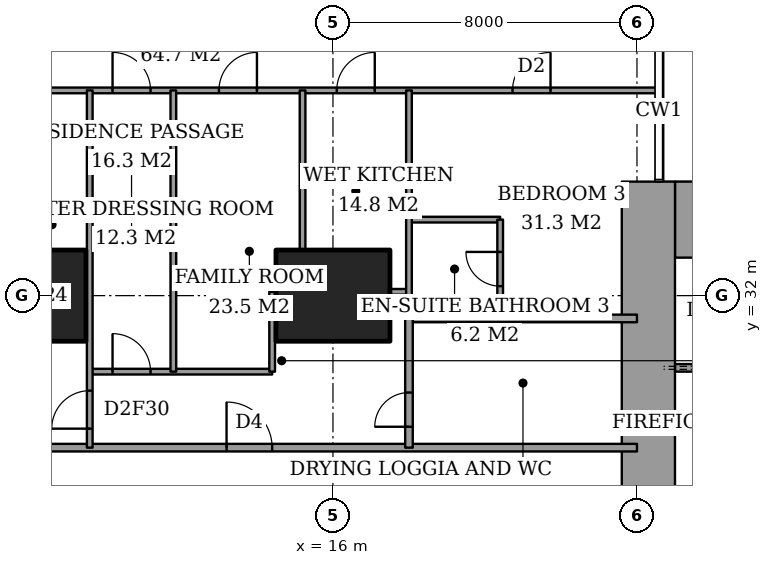
"""IFC4 building model, lengths in metres.
Left out: names, types, materials, properties, quantities, classifications, styles, units other than length and angle.
Written with IfcOpenShell. Run it as: python <this file> out.ifc"""

import sys

from ifc_helpers import new_model, si_unit, direction, frame, frame_2d, origin, origin_2d, place, context, subcontext, project, spatial, rectangle, extrude, element, fill, save


model = new_model("IFC4")
c1 = context("Model", 3, precision=1e-05, world=origin(), true_north=direction((0.0, 1.0)))
c2 = subcontext(c1, "Body", "Model", "MODEL_VIEW")
j1 = project(units=[si_unit("LENGTHUNIT", "METRE"), si_unit("PLANEANGLEUNIT", "RADIAN")], contexts=[c1])
p1 = place(None, origin())
s1 = spatial("IfcSite", under=j1, at=p1, CompositionType="ELEMENT")
p2 = place(p1, origin())
s2 = spatial("IfcBuilding", under=s1, at=p2, CompositionType="ELEMENT")
p3 = place(p2, frame((0.0, 0.0, 146.6)))
s3 = spatial("IfcBuildingStorey", under=s2, at=p3, CompositionType="ELEMENT", Elevation=146.6)
for number, where, z_axis, x_axis in (
    (1, (8.0, 32.0, 0.0), (0.0, 0.0, 1.0), (1.0, 0.0, 0.0)),
    (2, (16.0, 32.0, 0.0), (0.0, 0.0, 1.0), (1.0, 0.0, 0.0)),
):
    element("IfcColumn", number, at=place(p3, frame(where, z_axis=z_axis, x_axis=x_axis)), inside=s3, PredefinedType="COLUMN", context=c2, shape_type="SweptSolid", body=[
        extrude(rectangle(XDim=3.0, YDim=2.4, at=origin_2d()), origin(), (0.0, 0.0, 1.0), 3.6),
    ])
p4 = place(p3, frame((25.0, 34.0, 0.0), z_axis=(0.0, 0.0, 1.0), x_axis=(1.0, 0.0, 0.0)))
e3 = element("IfcWall", 3, at=p4, inside=s3, PredefinedType="SHEAR", context=c2, shape_type="SweptSolid", body=[
    extrude(rectangle(XDim=3.15, YDim=2.0, at=frame_2d((1.575, 0.0))), origin(), (0.0, 0.0, 1.0), 3.6),
])
p5 = place(p3, frame((24.3, 23.15, 0.0), z_axis=(0.0, 0.0, 1.0), x_axis=(0.0, 1.0, 0.0)))
e4 = element("IfcWall", 4, at=p5, inside=s3, PredefinedType="SHEAR", context=c2, shape_type="SweptSolid", body=[
    extrude(rectangle(XDim=11.85, YDim=1.4, at=frame_2d((5.925, 0.0))), origin(), (0.0, 0.0, 1.0), 3.6),
])
p6 = place(p5, frame((0.75, 0.0, 0.0)))
e5 = element("IfcOpeningElement", 5, at=p6, cuts=e4, PredefinedType="OPENING", context=c2, shape_type="SweptSolid", body=[
    extrude(rectangle(XDim=1.8, YDim=2.4, at=frame_2d((0.9, 1.2))), frame((0.0, 0.71, 0.0), z_axis=(0.0, -1.0, 0.0), x_axis=(1.0, 0.0, 0.0)), (0.0, 0.0, 1.0), 1.42),
])
p7 = place(p3, frame((6.725, 28.0, 0.0), z_axis=(0.0, 0.0, 1.0), x_axis=(1.0, 0.0, 0.0)))
e6 = element("IfcWall", 6, at=p7, inside=s3, PredefinedType="PARTITIONING", context=c2, shape_type="SweptSolid", body=[
    extrude(rectangle(XDim=17.275, YDim=0.2, at=frame_2d((8.637, 0.0))), origin(), (0.0, 0.0, 1.0), 3.35),
])
p8 = place(p7, frame((6.475, 0.0, 0.0)))
e7 = element("IfcOpeningElement", 7, at=p8, cuts=e6, PredefinedType="OPENING", context=c2, shape_type="SweptSolid", body=[
    extrude(rectangle(XDim=1.2, YDim=2.4, at=frame_2d((0.6, 1.2))), frame((0.0, 0.11, 0.0), z_axis=(0.0, -1.0, 0.0), x_axis=(1.0, 0.0, 0.0)), (0.0, 0.0, 1.0), 0.22),
])
p9 = place(p3, frame((9.6, 30.0, 0.0), z_axis=(0.0, 0.0, 1.0), x_axis=(1.0, 0.0, 0.0)))
e8 = element("IfcWall", 8, at=p9, inside=s3, PredefinedType="PARTITIONING", context=c2, shape_type="SweptSolid", body=[
    extrude(rectangle(XDim=4.8, YDim=0.15, at=frame_2d((2.4, 0.0))), origin(), (0.0, 0.0, 1.0), 3.35),
])
p10 = place(p9, frame((0.6, 0.0, 0.0)))
e9 = element("IfcOpeningElement", 9, at=p10, cuts=e8, PredefinedType="OPENING", context=c2, shape_type="SweptSolid", body=[
    extrude(rectangle(XDim=1.0, YDim=2.1, at=frame_2d((0.5, 1.05))), frame((0.0, 0.085, 0.0), z_axis=(0.0, -1.0, 0.0), x_axis=(1.0, 0.0, 0.0)), (0.0, 0.0, 1.0), 0.17),
])
p11 = place(p3, frame((18.0, 31.4, 0.0), z_axis=(0.0, 0.0, 1.0), x_axis=(1.0, 0.0, 0.0)))
e10 = element("IfcWall", 10, at=p11, inside=s3, PredefinedType="PARTITIONING", context=c2, shape_type="SweptSolid", body=[
    extrude(rectangle(XDim=6.0, YDim=0.2, at=frame_2d((3.0, 0.0))), origin(), (0.0, 0.0, 1.0), 3.35),
])
p12 = place(p3, frame((17.5, 32.1, 0.0), z_axis=(0.0, 0.0, 1.0), x_axis=(1.0, 0.0, 0.0)))
e11 = element("IfcWall", 11, at=p12, inside=s3, PredefinedType="PARTITIONING", context=c2, shape_type="SweptSolid", body=[
    extrude(rectangle(XDim=0.5, YDim=0.15, at=frame_2d((0.25, 0.0))), origin(), (0.0, 0.0, 1.0), 2.634),
])
p13 = place(p3, frame((18.0, 34.0, 0.0), z_axis=(0.0, 0.0, 1.0), x_axis=(1.0, 0.0, 0.0)))
e12 = element("IfcWall", 12, at=p13, inside=s3, PredefinedType="PARTITIONING", context=c2, shape_type="SweptSolid", body=[
    extrude(rectangle(XDim=2.4, YDim=0.15, at=frame_2d((1.2, 0.0))), origin(), (0.0, 0.0, 1.0), 3.35),
])
p14 = place(p3, frame((-0.45, 37.4, 0.0), z_axis=(0.0, 0.0, 1.0), x_axis=(1.0, 0.0, 0.0)))
e13 = element("IfcWall", 13, at=p14, inside=s3, PredefinedType="PARTITIONING", context=c2, shape_type="SweptSolid", body=[
    extrude(rectangle(XDim=25.011, YDim=0.15, at=frame_2d((12.505, 0.0))), origin(), (0.0, 0.0, 1.0), 3.35),
])
p15 = place(p14, frame((10.65, 0.0, 0.0)))
e14 = element("IfcOpeningElement", 14, at=p15, cuts=e13, PredefinedType="OPENING", context=c2, shape_type="SweptSolid", body=[
    extrude(rectangle(XDim=1.0, YDim=2.1, at=frame_2d((0.5, 1.05))), frame((0.0, 0.085, 0.0), z_axis=(0.0, -1.0, 0.0), x_axis=(1.0, 0.0, 0.0)), (0.0, 0.0, 1.0), 0.17),
])
p16 = place(p14, frame((3.087, 0.0, 0.0)))
e15 = element("IfcOpeningElement", 15, at=p16, cuts=e13, PredefinedType="OPENING", context=c2, shape_type="SweptSolid", body=[
    extrude(rectangle(XDim=1.0, YDim=2.1, at=frame_2d((0.5, 1.05))), frame((0.0, 0.085, 0.0), z_axis=(0.0, -1.0, 0.0), x_axis=(1.0, 0.0, 0.0)), (0.0, 0.0, 1.0), 0.17),
])
p17 = place(p14, frame((13.45, 0.0, 0.0)))
e16 = element("IfcOpeningElement", 16, at=p17, cuts=e13, PredefinedType="OPENING", context=c2, shape_type="SweptSolid", body=[
    extrude(rectangle(XDim=1.0, YDim=2.1, at=frame_2d((0.5, 1.05))), frame((0.0, 0.085, 0.0), z_axis=(0.0, -1.0, 0.0), x_axis=(1.0, 0.0, 0.0)), (0.0, 0.0, 1.0), 0.17),
])
p18 = place(p14, frame((16.55, 0.0, 0.0)))
e17 = element("IfcOpeningElement", 17, at=p18, cuts=e13, PredefinedType="OPENING", context=c2, shape_type="SweptSolid", body=[
    extrude(rectangle(XDim=1.0, YDim=2.1, at=frame_2d((0.5, 1.05))), frame((0.0, 0.085, 0.0), z_axis=(0.0, -1.0, 0.0), x_axis=(1.0, 0.0, 0.0)), (0.0, 0.0, 1.0), 0.17),
])
p19 = place(p14, frame((21.175, 0.0, 0.0)))
e18 = element("IfcOpeningElement", 18, at=p19, cuts=e13, PredefinedType="OPENING", context=c2, shape_type="SweptSolid", body=[
    extrude(rectangle(XDim=1.0, YDim=2.1, at=frame_2d((0.5, 1.05))), frame((0.0, 0.085, 0.0), z_axis=(0.0, -1.0, 0.0), x_axis=(1.0, 0.0, 0.0)), (0.0, 0.0, 1.0), 0.17),
])
p20 = place(p3, frame((9.6, 28.0, 0.0), z_axis=(0.0, 0.0, 1.0), x_axis=(0.0, 1.0, 0.0)))
e19 = element("IfcWall", 19, at=p20, inside=s3, PredefinedType="PARTITIONING", context=c2, shape_type="SweptSolid", body=[
    extrude(rectangle(XDim=9.4, YDim=0.15, at=frame_2d((4.7, 0.0))), origin(), (0.0, 0.0, 1.0), 3.35),
])
p21 = place(p20, frame((0.5, 0.0, 0.0)))
e20 = element("IfcOpeningElement", 20, at=p21, cuts=e19, PredefinedType="OPENING", context=c2, shape_type="SweptSolid", body=[
    extrude(rectangle(XDim=1.0, YDim=2.1, at=frame_2d((0.5, 1.05))), frame((0.0, 0.085, 0.0), z_axis=(0.0, -1.0, 0.0), x_axis=(1.0, 0.0, 0.0)), (0.0, 0.0, 1.0), 0.17),
])
p22 = place(p3, frame((11.8, 30.0, 0.0), z_axis=(0.0, 0.0, 1.0), x_axis=(0.0, 1.0, 0.0)))
e21 = element("IfcWall", 21, at=p22, inside=s3, PredefinedType="PARTITIONING", context=c2, shape_type="SweptSolid", body=[
    extrude(rectangle(XDim=7.4, YDim=0.15, at=frame_2d((3.7, 0.0))), origin(), (0.0, 0.0, 1.0), 3.35),
])
p23 = place(p3, frame((14.4, 30.0, 0.0), z_axis=(0.0, 0.0, 1.0), x_axis=(0.0, 1.0, 0.0)))
e22 = element("IfcWall", 22, at=p23, inside=s3, PredefinedType="PARTITIONING", context=c2, shape_type="SweptSolid", body=[
    extrude(rectangle(XDim=2.1, YDim=0.15, at=frame_2d((1.05, 0.0))), origin(), (0.0, 0.0, 1.0), 3.35),
])
p24 = place(p3, frame((15.2, 33.2, 0.0), z_axis=(0.0, 0.0, 1.0), x_axis=(0.0, 1.0, 0.0)))
e23 = element("IfcWall", 23, at=p24, inside=s3, PredefinedType="PARTITIONING", context=c2, shape_type="SweptSolid", body=[
    extrude(rectangle(XDim=4.2, YDim=0.15, at=frame_2d((2.1, 0.0))), origin(), (0.0, 0.0, 1.0), 3.35),
])
p25 = place(p3, frame((18.0, 28.0, 0.0), z_axis=(0.0, 0.0, 1.0), x_axis=(0.0, 1.0, 0.0)))
e24 = element("IfcWall", 24, at=p25, inside=s3, PredefinedType="PARTITIONING", context=c2, shape_type="SweptSolid", body=[
    extrude(rectangle(XDim=3.4, YDim=0.2, at=frame_2d((1.7, 0.0))), origin(), (0.0, 0.0, 1.0), 3.35),
])
p26 = place(p25, frame((0.55, 0.0, 0.0)))
e25 = element("IfcOpeningElement", 25, at=p26, cuts=e24, PredefinedType="OPENING", context=c2, shape_type="SweptSolid", body=[
    extrude(rectangle(XDim=0.9, YDim=2.1, at=frame_2d((0.45, 1.05))), frame((0.0, 0.11, 0.0), z_axis=(0.0, -1.0, 0.0), x_axis=(1.0, 0.0, 0.0)), (0.0, 0.0, 1.0), 0.22),
])
p27 = place(p3, frame((18.0, 31.4, 0.0), z_axis=(0.0, 0.0, 1.0), x_axis=(0.0, 1.0, 0.0)))
e26 = element("IfcWall", 26, at=p27, inside=s3, PredefinedType="PARTITIONING", context=c2, shape_type="SweptSolid", body=[
    extrude(rectangle(XDim=6.0, YDim=0.15, at=frame_2d((3.0, 0.0))), origin(), (0.0, 0.0, 1.0), 3.35),
])
p28 = place(p3, frame((20.4, 31.4, 0.0), z_axis=(0.0, 0.0, 1.0), x_axis=(0.0, 1.0, 0.0)))
e27 = element("IfcWall", 27, at=p28, inside=s3, PredefinedType="PARTITIONING", context=c2, shape_type="SweptSolid", body=[
    extrude(rectangle(XDim=2.6, YDim=0.15, at=frame_2d((1.3, 0.0))), origin(), (0.0, 0.0, 1.0), 3.35),
])
p29 = place(p28, frame((0.85, 0.0, 0.0)))
e28 = element("IfcOpeningElement", 28, at=p29, cuts=e27, PredefinedType="OPENING", context=c2, shape_type="SweptSolid", body=[
    extrude(rectangle(XDim=0.9, YDim=2.1, at=frame_2d((0.45, 1.05))), frame((0.0, 0.085, 0.0), z_axis=(0.0, -1.0, 0.0), x_axis=(1.0, 0.0, 0.0)), (0.0, 0.0, 1.0), 0.17),
])
p30 = place(p3, frame((25.0, 30.1, 0.0), z_axis=(0.0, 0.0, 1.0), x_axis=(1.0, 0.0, 0.0)))
e29 = element("IfcWall", 29, at=p30, inside=s3, PredefinedType="PARTITIONING", context=c2, shape_type="SweptSolid", body=[
    extrude(rectangle(XDim=12.7, YDim=0.2, at=frame_2d((6.35, 0.0))), origin(), (0.0, 0.0, 1.0), 3.6),
])
p31 = place(p30, frame((0.9, 0.0, 0.0)))
e30 = element("IfcOpeningElement", 30, at=p31, cuts=e29, PredefinedType="OPENING", context=c2, shape_type="SweptSolid", body=[
    extrude(rectangle(XDim=1.2, YDim=2.1, at=frame_2d((0.6, 1.05))), frame((0.0, 0.11, 0.0), z_axis=(0.0, -1.0, 0.0), x_axis=(1.0, 0.0, 0.0)), (0.0, 0.0, 1.0), 0.22),
])
p32 = place(p15, origin())
e31 = element("IfcDoor", 31, at=p32, inside=s3, OperationType="SINGLE_SWING_RIGHT", PredefinedType="DOOR", context=c2, shape_type="SweptSolid", body=[
    extrude(rectangle(XDim=1.0, YDim=2.1, at=frame_2d((0.5, 1.05))), frame((0.0, 0.025, 0.0), z_axis=(0.0, -1.0, 0.0), x_axis=(1.0, 0.0, 0.0)), (0.0, 0.0, 1.0), 0.05),
])
fill(e14, e31)
p33 = place(p21, origin())
e32 = element("IfcDoor", 32, at=p33, inside=s3, OperationType="SINGLE_SWING_RIGHT", PredefinedType="DOOR", context=c2, shape_type="SweptSolid", body=[
    extrude(rectangle(XDim=1.0, YDim=2.1, at=frame_2d((0.5, 1.05))), frame((0.0, 0.025, 0.0), z_axis=(0.0, -1.0, 0.0), x_axis=(1.0, 0.0, 0.0)), (0.0, 0.0, 1.0), 0.05),
])
fill(e20, e32)
p34 = place(p8, origin())
e33 = element("IfcDoor", 33, at=p34, inside=s3, OperationType="SINGLE_SWING_RIGHT", PredefinedType="DOOR", context=c2, shape_type="SweptSolid", body=[
    extrude(rectangle(XDim=1.2, YDim=2.4, at=frame_2d((0.6, 1.2))), frame((0.0, 0.025, 0.0), z_axis=(0.0, -1.0, 0.0), x_axis=(1.0, 0.0, 0.0)), (0.0, 0.0, 1.0), 0.05),
])
fill(e7, e33)
p35 = place(p10, origin())
e34 = element("IfcDoor", 34, at=p35, inside=s3, OperationType="SINGLE_SWING_RIGHT", PredefinedType="DOOR", context=c2, shape_type="SweptSolid", body=[
    extrude(rectangle(XDim=1.0, YDim=2.1, at=frame_2d((0.5, 1.05))), frame((0.0, 0.025, 0.0), z_axis=(0.0, -1.0, 0.0), x_axis=(1.0, 0.0, 0.0)), (0.0, 0.0, 1.0), 0.05),
])
fill(e9, e34)
p36 = place(p17, origin())
e35 = element("IfcDoor", 35, at=p36, inside=s3, OperationType="SINGLE_SWING_LEFT", PredefinedType="DOOR", context=c2, shape_type="SweptSolid", body=[
    extrude(rectangle(XDim=1.0, YDim=2.1, at=frame_2d((0.5, 1.05))), frame((0.0, 0.025, 0.0), z_axis=(0.0, -1.0, 0.0), x_axis=(1.0, 0.0, 0.0)), (0.0, 0.0, 1.0), 0.05),
])
fill(e16, e35)
p37 = place(p18, origin())
e36 = element("IfcDoor", 36, at=p37, inside=s3, OperationType="SINGLE_SWING_LEFT", PredefinedType="DOOR", context=c2, shape_type="SweptSolid", body=[
    extrude(rectangle(XDim=1.0, YDim=2.1, at=frame_2d((0.5, 1.05))), frame((0.0, 0.025, 0.0), z_axis=(0.0, -1.0, 0.0), x_axis=(1.0, 0.0, 0.0)), (0.0, 0.0, 1.0), 0.05),
])
fill(e17, e36)
p38 = place(p29, origin())
e37 = element("IfcDoor", 37, at=p38, inside=s3, OperationType="SINGLE_SWING_LEFT", PredefinedType="DOOR", context=c2, shape_type="SweptSolid", body=[
    extrude(rectangle(XDim=0.9, YDim=2.1, at=frame_2d((0.45, 1.05))), frame((0.0, 0.025, 0.0), z_axis=(0.0, -1.0, 0.0), x_axis=(1.0, 0.0, 0.0)), (0.0, 0.0, 1.0), 0.05),
])
fill(e28, e37)
p39 = place(p19, origin())
e38 = element("IfcDoor", 38, at=p39, inside=s3, OperationType="SINGLE_SWING_LEFT", PredefinedType="DOOR", context=c2, shape_type="SweptSolid", body=[
    extrude(rectangle(XDim=1.0, YDim=2.1, at=frame_2d((0.5, 1.05))), frame((0.0, 0.025, 0.0), z_axis=(0.0, -1.0, 0.0), x_axis=(1.0, 0.0, 0.0)), (0.0, 0.0, 1.0), 0.05),
])
fill(e18, e38)
p40 = place(p26, origin())
e39 = element("IfcDoor", 39, at=p40, inside=s3, OperationType="SINGLE_SWING_RIGHT", PredefinedType="DOOR", context=c2, shape_type="SweptSolid", body=[
    extrude(rectangle(XDim=0.9, YDim=2.1, at=frame_2d((0.45, 1.05))), frame((0.0, 0.025, 0.0), z_axis=(0.0, -1.0, 0.0), x_axis=(1.0, 0.0, 0.0)), (0.0, 0.0, 1.0), 0.05),
])
fill(e25, e39)
save(model, sys.argv[1])
